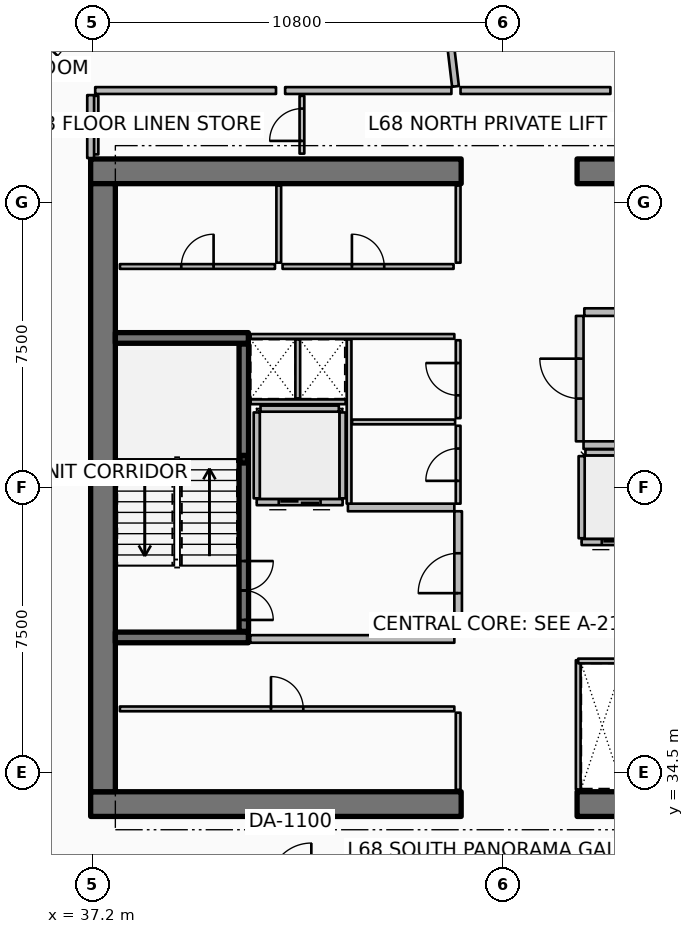
"""IFC4 building model, lengths in metres.
Left out: names, types, materials, properties, quantities, classifications, styles, units other than length and angle.
Written with IfcOpenShell. Run it as: python <this file> out.ifc"""

import sys

from ifc_helpers import new_model, si_unit, direction, frame, frame_2d, origin, origin_2d, place, context, subcontext, project, spatial, rectangle, hollow_rectangle, extrude, element, fill, save


model = new_model("IFC4")
c1 = context("Model", 3, precision=1e-05, world=origin(), true_north=direction((0.0, 1.0)))
c2 = subcontext(c1, "Body", "Model", "MODEL_VIEW")
j1 = project(units=[si_unit("LENGTHUNIT", "METRE"), si_unit("PLANEANGLEUNIT", "RADIAN")], contexts=[c1])
p1 = place(None, origin())
s1 = spatial("IfcSite", under=j1, at=p1, CompositionType="ELEMENT")
p2 = place(p1, origin())
s2 = spatial("IfcBuilding", under=s1, at=p2, CompositionType="ELEMENT")
p3 = place(p2, frame((0.0, 0.0, 271.35)))
s3 = spatial("IfcBuildingStorey", under=s2, at=p3, CompositionType="ELEMENT", Elevation=271.35)
for number, where, z_axis, x_axis in (
    (1, (37.15, 33.675, 0.0), (0.0, 0.0, 1.0), (1.0, 0.0, 0.0)),
    (2, (49.95, 33.675, 0.0), (0.0, 0.0, 1.0), (1.0, 0.0, 0.0)),
    (3, (37.15, 50.325, 0.0), (0.0, 0.0, 1.0), (1.0, 0.0, 0.0)),
    (4, (49.95, 50.325, 0.0), (0.0, 0.0, 1.0), (1.0, 0.0, 0.0)),
):
    element("IfcWall", number, at=place(p3, frame(where, z_axis=z_axis, x_axis=x_axis)), inside=s3, PredefinedType="SHEAR", context=c2, shape_type="SweptSolid", body=[
        extrude(rectangle(XDim=9.75, YDim=0.65, at=frame_2d((4.875, 0.0))), origin(), (0.0, 0.0, 1.0), 3.85),
    ])
p4 = place(p3, frame((37.475, 34.0, 0.0), z_axis=(0.0, 0.0, 1.0), x_axis=(0.0, 1.0, 0.0)))
e5 = element("IfcWall", 5, at=p4, inside=s3, PredefinedType="SHEAR", context=c2, shape_type="SweptSolid", body=[
    extrude(rectangle(XDim=16.0, YDim=0.65, at=frame_2d((8.0, 0.0))), origin(), (0.0, 0.0, 1.0), 3.85),
])
for number, where, z_axis, x_axis in (
    (6, (37.8, 38.06, 0.0), (0.0, 0.0, 1.0), (1.0, 0.0, 0.0)),
    (7, (37.8, 45.94, 0.0), (0.0, 0.0, 1.0), (1.0, 0.0, 0.0)),
):
    element("IfcWall", number, at=place(p3, frame(where, z_axis=z_axis, x_axis=x_axis)), inside=s3, PredefinedType="SHEAR", context=c2, shape_type="SweptSolid", body=[
        extrude(rectangle(XDim=3.5, YDim=0.28, at=frame_2d((1.75, 0.0))), origin(), (0.0, 0.0, 1.0), 3.85),
    ])
p5 = place(p3, frame((41.18, 42.75, 0.0), z_axis=(0.0, 0.0, 1.0), x_axis=(1.0, 0.0, 0.0)))
e8 = element("IfcColumn", 8, at=p5, inside=s3, PredefinedType="COLUMN", context=c2, shape_type="SweptSolid", body=[
    extrude(hollow_rectangle(XDim=0.2, YDim=0.2, WallThickness=0.01, InnerFilletRadius=0.01, OuterFilletRadius=0.02, at=origin_2d()), origin(), (0.0, 0.0, 1.0), 1.72),
])
p6 = place(p3, frame((41.18, 38.22, 0.0), z_axis=(0.0, 0.0, 1.0), x_axis=(0.0, 1.0, 0.0)))
e9 = element("IfcWall", 9, at=p6, inside=s3, PredefinedType="SOLIDWALL", context=c2, shape_type="SweptSolid", body=[
    extrude(rectangle(XDim=7.56, YDim=0.25, at=frame_2d((3.78, 0.0))), origin(), (0.0, 0.0, 1.0), 3.59),
])
p7 = place(p6, frame((0.3, 0.0, 0.0)))
e10 = element("IfcOpeningElement", 10, at=p7, cuts=e9, PredefinedType="OPENING", context=c2, shape_type="SweptSolid", body=[
    extrude(rectangle(XDim=1.55, YDim=2.15, at=frame_2d((0.775, 1.075))), frame((0.0, 0.135, 0.0), z_axis=(0.0, -1.0, 0.0), x_axis=(1.0, 0.0, 0.0)), (0.0, 0.0, 1.0), 0.27),
])
p8 = place(p3, frame((43.78, 41.62, 0.0), z_axis=(0.0, 0.0, 1.0), x_axis=(-1.0, 0.0, 0.0)))
e11 = element("IfcWall", 11, at=p8, inside=s3, PredefinedType="PARTITIONING", context=c2, shape_type="SweptSolid", body=[
    extrude(rectangle(XDim=2.26, YDim=0.16, at=frame_2d((1.13, 0.0))), origin(), (0.0, 0.0, 1.0), 3.59),
])
p9 = place(p8, frame((0.58, 0.0, 0.0)))
e12 = element("IfcOpeningElement", 12, at=p9, cuts=e11, PredefinedType="OPENING", context=c2, shape_type="SweptSolid", body=[
    extrude(rectangle(XDim=1.1, YDim=2.1, at=frame_2d((0.55, 1.05))), frame((0.0, 0.09, 0.0), z_axis=(0.0, -1.0, 0.0), x_axis=(1.0, 0.0, 0.0)), (0.0, 0.0, 1.0), 0.18),
])
for number, where, z_axis, x_axis in (
    (13, (43.78, 41.72, 0.0), (0.0, 0.0, 1.0), (0.0, 1.0, 0.0)),
    (14, (41.52, 41.72, 0.0), (0.0, 0.0, 1.0), (0.0, 1.0, 0.0)),
):
    element("IfcWall", number, at=place(p3, frame(where, z_axis=z_axis, x_axis=x_axis)), inside=s3, PredefinedType="PARTITIONING", context=c2, shape_type="SweptSolid", body=[
        extrude(rectangle(XDim=2.26, YDim=0.16, at=frame_2d((1.13, 0.0))), origin(), (0.0, 0.0, 1.0), 3.59),
    ])
p10 = place(p3, frame((41.62, 44.08, 0.0), z_axis=(0.0, 0.0, 1.0), x_axis=(1.0, 0.0, 0.0)))
e15 = element("IfcWall", 15, at=p10, inside=s3, PredefinedType="PARTITIONING", context=c2, shape_type="SweptSolid", body=[
    extrude(rectangle(XDim=2.06, YDim=0.16, at=frame_2d((1.03, 0.0))), origin(), (0.0, 0.0, 1.0), 3.59),
])
p11 = place(p3, frame((52.23, 40.57, 0.0), z_axis=(0.0, 0.0, 1.0), x_axis=(-1.0, 0.0, 0.0)))
e16 = element("IfcWall", 16, at=p11, inside=s3, PredefinedType="PARTITIONING", context=c2, shape_type="SweptSolid", body=[
    extrude(rectangle(XDim=2.16, YDim=0.16, at=frame_2d((1.08, 0.0))), origin(), (0.0, 0.0, 1.0), 3.59),
])
p12 = place(p11, frame((0.53, 0.0, 0.0)))
e17 = element("IfcOpeningElement", 17, at=p12, cuts=e16, PredefinedType="OPENING", context=c2, shape_type="SweptSolid", body=[
    extrude(rectangle(XDim=1.1, YDim=2.1, at=frame_2d((0.55, 1.05))), frame((0.0, 0.09, 0.0), z_axis=(0.0, -1.0, 0.0), x_axis=(1.0, 0.0, 0.0)), (0.0, 0.0, 1.0), 0.18),
])
p13 = place(p3, frame((50.07, 40.67, 0.0), z_axis=(0.0, 0.0, 1.0), x_axis=(0.0, 1.0, 0.0)))
e18 = element("IfcWall", 18, at=p13, inside=s3, PredefinedType="PARTITIONING", context=c2, shape_type="SweptSolid", body=[
    extrude(rectangle(XDim=2.16, YDim=0.16, at=frame_2d((1.08, 0.0))), origin(), (0.0, 0.0, 1.0), 3.59),
])
p14 = place(p3, frame((50.17, 42.93, 0.0), z_axis=(0.0, 0.0, 1.0), x_axis=(1.0, 0.0, 0.0)))
e19 = element("IfcWall", 19, at=p14, inside=s3, PredefinedType="PARTITIONING", context=c2, shape_type="SweptSolid", body=[
    extrude(rectangle(XDim=1.96, YDim=0.16, at=frame_2d((0.98, 0.0))), origin(), (0.0, 0.0, 1.0), 3.59),
])
p15 = place(p3, frame((46.82, 34.05, 0.0), z_axis=(0.0, 0.0, 1.0), x_axis=(0.0, 1.0, 0.0)))
e20 = element("IfcWall", 20, at=p15, inside=s3, PredefinedType="PARTITIONING", context=c2, shape_type="SweptSolid", body=[
    extrude(rectangle(XDim=2.03, YDim=0.125, at=frame_2d((1.015, 0.0))), origin(), (0.0, 0.0, 1.0), 3.03),
])
p16 = place(p3, frame((37.92, 36.18, 0.0), z_axis=(0.0, 0.0, 1.0), x_axis=(1.0, 0.0, 0.0)))
e21 = element("IfcWall", 21, at=p16, inside=s3, PredefinedType="PARTITIONING", context=c2, shape_type="SweptSolid", body=[
    extrude(rectangle(XDim=8.8, YDim=0.125, at=frame_2d((4.4, 0.0))), origin(), (0.0, 0.0, 1.0), 3.03),
])
p17 = place(p16, frame((3.975, 0.0, 0.0)))
e22 = element("IfcOpeningElement", 22, at=p17, cuts=e21, PredefinedType="OPENING", context=c2, shape_type="SweptSolid", body=[
    extrude(rectangle(XDim=0.85, YDim=2.06, at=frame_2d((0.425, 1.03))), frame((0.0, 0.073, 0.0), z_axis=(0.0, -1.0, 0.0), x_axis=(1.0, 0.0, 0.0)), (0.0, 0.0, 1.0), 0.145),
])
for number, where, z_axis, x_axis in (
    (23, (46.82, 47.92, 0.0), (0.0, 0.0, 1.0), (0.0, 1.0, 0.0)),
    (24, (42.1, 47.92, 0.0), (0.0, 0.0, 1.0), (0.0, 1.0, 0.0)),
):
    element("IfcWall", number, at=place(p3, frame(where, z_axis=z_axis, x_axis=x_axis)), inside=s3, PredefinedType="PARTITIONING", context=c2, shape_type="SweptSolid", body=[
        extrude(rectangle(XDim=2.03, YDim=0.125, at=frame_2d((1.015, 0.0))), origin(), (0.0, 0.0, 1.0), 3.03),
    ])
p18 = place(p3, frame((37.92, 47.82, 0.0), z_axis=(0.0, 0.0, 1.0), x_axis=(1.0, 0.0, 0.0)))
e25 = element("IfcWall", 25, at=p18, inside=s3, PredefinedType="PARTITIONING", context=c2, shape_type="SweptSolid", body=[
    extrude(rectangle(XDim=4.08, YDim=0.125, at=frame_2d((2.04, 0.0))), origin(), (0.0, 0.0, 1.0), 3.03),
])
p19 = place(p18, frame((1.615, 0.0, 0.0)))
e26 = element("IfcOpeningElement", 26, at=p19, cuts=e25, PredefinedType="OPENING", context=c2, shape_type="SweptSolid", body=[
    extrude(rectangle(XDim=0.85, YDim=2.06, at=frame_2d((0.425, 1.03))), frame((0.0, 0.073, 0.0), z_axis=(0.0, -1.0, 0.0), x_axis=(1.0, 0.0, 0.0)), (0.0, 0.0, 1.0), 0.145),
])
p20 = place(p3, frame((42.2, 47.82, 0.0), z_axis=(0.0, 0.0, 1.0), x_axis=(1.0, 0.0, 0.0)))
e27 = element("IfcWall", 27, at=p20, inside=s3, PredefinedType="PARTITIONING", context=c2, shape_type="SweptSolid", body=[
    extrude(rectangle(XDim=4.5, YDim=0.125, at=frame_2d((2.25, 0.0))), origin(), (0.0, 0.0, 1.0), 3.03),
])
p21 = place(p20, frame((1.825, 0.0, 0.0)))
e28 = element("IfcOpeningElement", 28, at=p21, cuts=e27, PredefinedType="OPENING", context=c2, shape_type="SweptSolid", body=[
    extrude(rectangle(XDim=0.85, YDim=2.06, at=frame_2d((0.425, 1.03))), frame((0.0, 0.073, 0.0), z_axis=(0.0, -1.0, 0.0), x_axis=(1.0, 0.0, 0.0)), (0.0, 0.0, 1.0), 0.145),
])
p22 = place(p3, frame((41.35, 38.02, 0.0), z_axis=(0.0, 0.0, 1.0), x_axis=(1.0, 0.0, 0.0)))
e29 = element("IfcWall", 29, at=p22, inside=s3, PredefinedType="PARTITIONING", context=c2, shape_type="SweptSolid", body=[
    extrude(rectangle(XDim=5.37, YDim=0.2, at=frame_2d((2.685, 0.0))), origin(), (0.0, 0.0, 1.0), 3.59),
])
p23 = place(p3, frame((43.92, 41.48, 0.0), z_axis=(0.0, 0.0, 1.0), x_axis=(1.0, 0.0, 0.0)))
e30 = element("IfcWall", 30, at=p23, inside=s3, PredefinedType="PARTITIONING", context=c2, shape_type="SweptSolid", body=[
    extrude(rectangle(XDim=2.8, YDim=0.2, at=frame_2d((1.4, 0.0))), origin(), (0.0, 0.0, 1.0), 3.59),
])
p24 = place(p3, frame((46.82, 38.12, 0.0), z_axis=(0.0, 0.0, 1.0), x_axis=(0.0, 1.0, 0.0)))
e31 = element("IfcWall", 31, at=p24, inside=s3, PredefinedType="PARTITIONING", context=c2, shape_type="SweptSolid", body=[
    extrude(rectangle(XDim=3.26, YDim=0.2, at=frame_2d((1.63, 0.0))), origin(), (0.0, 0.0, 1.0), 3.59),
])
p25 = place(p24, frame((1.105, 0.0, 0.0)))
e32 = element("IfcOpeningElement", 32, at=p25, cuts=e31, PredefinedType="OPENING", context=c2, shape_type="SweptSolid", body=[
    extrude(rectangle(XDim=1.05, YDim=2.1, at=frame_2d((0.525, 1.05))), frame((0.0, 0.11, 0.0), z_axis=(0.0, -1.0, 0.0), x_axis=(1.0, 0.0, 0.0)), (0.0, 0.0, 1.0), 0.22),
])
p26 = place(p3, frame((50.12, 43.12, 0.0), z_axis=(0.0, 0.0, 1.0), x_axis=(1.0, 0.0, 0.0)))
e33 = element("IfcWall", 33, at=p26, inside=s3, PredefinedType="PARTITIONING", context=c2, shape_type="SweptSolid", body=[
    extrude(rectangle(XDim=8.88, YDim=0.2, at=frame_2d((4.44, 0.0))), origin(), (0.0, 0.0, 1.0), 3.59),
])
p27 = place(p3, frame((50.14, 46.62, 0.0), z_axis=(0.0, 0.0, 1.0), x_axis=(1.0, 0.0, 0.0)))
e34 = element("IfcWall", 34, at=p27, inside=s3, PredefinedType="PARTITIONING", context=c2, shape_type="SweptSolid", body=[
    extrude(rectangle(XDim=1.02, YDim=0.2, at=frame_2d((0.51, 0.0))), origin(), (0.0, 0.0, 1.0), 3.59),
])
p28 = place(p3, frame((50.02, 43.22, 0.0), z_axis=(0.0, 0.0, 1.0), x_axis=(0.0, 1.0, 0.0)))
e35 = element("IfcWall", 35, at=p28, inside=s3, PredefinedType="PARTITIONING", context=c2, shape_type="SweptSolid", body=[
    extrude(rectangle(XDim=3.3, YDim=0.2, at=frame_2d((1.65, 0.0))), origin(), (0.0, 0.0, 1.0), 3.59),
])
p29 = place(p28, frame((1.125, 0.0, 0.0)))
e36 = element("IfcOpeningElement", 36, at=p29, cuts=e35, PredefinedType="OPENING", context=c2, shape_type="SweptSolid", body=[
    extrude(rectangle(XDim=1.05, YDim=2.1, at=frame_2d((0.525, 1.05))), frame((0.0, 0.11, 0.0), z_axis=(0.0, -1.0, 0.0), x_axis=(1.0, 0.0, 0.0)), (0.0, 0.0, 1.0), 0.22),
])
p30 = place(p3, frame((41.36, 45.98, 0.0), z_axis=(0.0, 0.0, 1.0), x_axis=(1.0, 0.0, 0.0)))
e37 = element("IfcWall", 37, at=p30, inside=s3, PredefinedType="PARTITIONING", context=c2, shape_type="SweptSolid", body=[
    extrude(rectangle(XDim=5.36, YDim=0.125, at=frame_2d((2.68, 0.0))), origin(), (0.0, 0.0, 1.0), 3.03),
])
p31 = place(p3, frame((41.36, 44.26, 0.0), z_axis=(0.0, 0.0, 1.0), x_axis=(1.0, 0.0, 0.0)))
e38 = element("IfcWall", 38, at=p31, inside=s3, PredefinedType="PARTITIONING", context=c2, shape_type="SweptSolid", body=[
    extrude(rectangle(XDim=2.5, YDim=0.125, at=frame_2d((1.25, 0.0))), origin(), (0.0, 0.0, 1.0), 3.03),
])
p32 = place(p3, frame((42.6, 44.35, 0.0), z_axis=(0.0, 0.0, 1.0), x_axis=(0.0, 1.0, 0.0)))
e39 = element("IfcWall", 39, at=p32, inside=s3, PredefinedType="PARTITIONING", context=c2, shape_type="SweptSolid", body=[
    extrude(rectangle(XDim=1.55, YDim=0.125, at=frame_2d((0.775, 0.0))), origin(), (0.0, 0.0, 1.0), 3.03),
])
p33 = place(p3, frame((49.98, 34.06, 0.0), z_axis=(0.0, 0.0, 1.0), x_axis=(0.0, 1.0, 0.0)))
e40 = element("IfcWall", 40, at=p33, inside=s3, PredefinedType="PARTITIONING", context=c2, shape_type="SweptSolid", body=[
    extrude(rectangle(XDim=3.4, YDim=0.125, at=frame_2d((1.7, 0.0))), origin(), (0.0, 0.0, 1.0), 3.03),
])
p34 = place(p3, frame((49.98, 37.44, 0.0), z_axis=(0.0, 0.0, 1.0), x_axis=(1.0, 0.0, 0.0)))
e41 = element("IfcWall", 41, at=p34, inside=s3, PredefinedType="PARTITIONING", context=c2, shape_type="SweptSolid", body=[
    extrude(rectangle(XDim=1.26, YDim=0.125, at=frame_2d((0.63, 0.0))), origin(), (0.0, 0.0, 1.0), 3.03),
])
p35 = place(p3, frame((43.95, 41.58, 0.0), z_axis=(0.0, 0.0, 1.0), x_axis=(0.0, 1.0, 0.0)))
e42 = element("IfcWall", 42, at=p35, inside=s3, PredefinedType="PARTITIONING", context=c2, shape_type="SweptSolid", body=[
    extrude(rectangle(XDim=4.32, YDim=0.125, at=frame_2d((2.16, 0.0))), origin(), (0.0, 0.0, 1.0), 3.03),
])
p36 = place(p3, frame((44.03, 43.73, 0.0), z_axis=(0.0, 0.0, 1.0), x_axis=(1.0, 0.0, 0.0)))
e43 = element("IfcWall", 43, at=p36, inside=s3, PredefinedType="PARTITIONING", context=c2, shape_type="SweptSolid", body=[
    extrude(rectangle(XDim=2.71, YDim=0.125, at=frame_2d((1.355, 0.0))), origin(), (0.0, 0.0, 1.0), 3.03),
])
p37 = place(p3, frame((46.82, 41.58, 0.0), z_axis=(0.0, 0.0, 1.0), x_axis=(0.0, 1.0, 0.0)))
e44 = element("IfcWall", 44, at=p37, inside=s3, PredefinedType="PARTITIONING", context=c2, shape_type="SweptSolid", body=[
    extrude(rectangle(XDim=2.05, YDim=0.125, at=frame_2d((1.025, 0.0))), origin(), (0.0, 0.0, 1.0), 3.03),
])
p38 = place(p37, frame((0.6, 0.0, 0.0)))
e45 = element("IfcOpeningElement", 45, at=p38, cuts=e44, PredefinedType="OPENING", context=c2, shape_type="SweptSolid", body=[
    extrude(rectangle(XDim=0.85, YDim=2.06, at=frame_2d((0.425, 1.03))), frame((0.0, 0.073, 0.0), z_axis=(0.0, -1.0, 0.0), x_axis=(1.0, 0.0, 0.0)), (0.0, 0.0, 1.0), 0.145),
])
p39 = place(p3, frame((46.82, 43.83, 0.0), z_axis=(0.0, 0.0, 1.0), x_axis=(0.0, 1.0, 0.0)))
e46 = element("IfcWall", 46, at=p39, inside=s3, PredefinedType="PARTITIONING", context=c2, shape_type="SweptSolid", body=[
    extrude(rectangle(XDim=2.05, YDim=0.125, at=frame_2d((1.025, 0.0))), origin(), (0.0, 0.0, 1.0), 3.03),
])
p40 = place(p39, frame((0.6, 0.0, 0.0)))
e47 = element("IfcOpeningElement", 47, at=p40, cuts=e46, PredefinedType="OPENING", context=c2, shape_type="SweptSolid", body=[
    extrude(rectangle(XDim=0.85, YDim=2.06, at=frame_2d((0.425, 1.03))), frame((0.0, 0.073, 0.0), z_axis=(0.0, -1.0, 0.0), x_axis=(1.0, 0.0, 0.0)), (0.0, 0.0, 1.0), 0.145),
])
p41 = place(p3, frame((37.29, 50.77, 0.0), z_axis=(0.0, 0.0, 1.0), x_axis=(0.0, 1.0, 0.0)))
e48 = element("IfcWall", 48, at=p41, inside=s3, PredefinedType="PARTITIONING", context=c2, shape_type="SweptSolid", body=[
    extrude(rectangle(XDim=1.54, YDim=0.125, at=frame_2d((0.77, 0.0))), origin(), (0.0, 0.0, 1.0), 3.03),
])
p42 = place(p3, frame((42.71, 50.79, 0.0), z_axis=(0.0, 0.0, 1.0), x_axis=(0.0, 1.0, 0.0)))
e49 = element("IfcWall", 49, at=p42, inside=s3, PredefinedType="PARTITIONING", context=c2, shape_type="SweptSolid", body=[
    extrude(rectangle(XDim=1.52, YDim=0.125, at=frame_2d((0.76, 0.0))), origin(), (0.0, 0.0, 1.0), 2.957),
])
p43 = place(p42, frame((0.335, 0.0, 0.0)))
e50 = element("IfcOpeningElement", 50, at=p43, cuts=e49, PredefinedType="OPENING", context=c2, shape_type="SweptSolid", body=[
    extrude(rectangle(XDim=0.85, YDim=2.06, at=frame_2d((0.425, 1.03))), frame((0.0, 0.073, 0.0), z_axis=(0.0, -1.0, 0.0), x_axis=(1.0, 0.0, 0.0)), (0.0, 0.0, 1.0), 0.145),
])
p44 = place(p3, frame((46.75, 52.559, 0.0), z_axis=(0.0, 0.0, 1.0), x_axis=(-0.117540318076, 0.993068111273, 0.0)))
e51 = element("IfcWall", 51, at=p44, inside=s3, PredefinedType="PARTITIONING", context=c2, shape_type="SweptSolid", body=[
    extrude(rectangle(XDim=14.062, YDim=0.18, at=frame_2d((7.031, 0.0))), origin(), (0.0, 0.0, 1.0), 2.957),
])
p45 = place(p3, frame((46.643, 52.45, 0.0), z_axis=(0.0, 0.0, 1.0), x_axis=(-1.0, 0.0, 0.0)))
e52 = element("IfcWall", 52, at=p45, inside=s3, PredefinedType="PARTITIONING", context=c2, shape_type="SweptSolid", body=[
    extrude(rectangle(XDim=4.376, YDim=0.18, at=frame_2d((2.188, 0.0))), origin(), (0.0, 0.0, 1.0), 2.957),
])
p46 = place(p3, frame((42.028, 52.45, 0.0), z_axis=(0.0, 0.0, 1.0), x_axis=(-1.0, 0.0, 0.0)))
e53 = element("IfcWall", 53, at=p46, inside=s3, PredefinedType="PARTITIONING", context=c2, shape_type="SweptSolid", body=[
    extrude(rectangle(XDim=4.758, YDim=0.18, at=frame_2d((2.379, 0.0))), origin(), (0.0, 0.0, 1.0), 2.957),
])
p47 = place(p3, frame((37.15, 52.33, 0.0), z_axis=(0.0, 0.0, 1.0), x_axis=(0.0, -1.0, 0.0)))
e54 = element("IfcWall", 54, at=p47, inside=s3, PredefinedType="PARTITIONING", context=c2, shape_type="SweptSolid", body=[
    extrude(rectangle(XDim=1.656, YDim=0.18, at=frame_2d((0.828, 0.0))), origin(), (0.0, 0.0, 1.0), 2.957),
])
p48 = place(p3, frame((37.506, 55.822, 0.0), z_axis=(0.0, 0.0, 1.0), x_axis=(-0.715105814901, -0.699016218334, 0.0)))
e55 = element("IfcWall", 55, at=p48, inside=s3, PredefinedType="PARTITIONING", context=c2, shape_type="SweptSolid", body=[
    extrude(rectangle(XDim=4.294, YDim=0.125, at=frame_2d((2.147, 0.0))), origin(), (0.0, 0.0, 1.0), 2.957),
])
p49 = place(p48, frame((1.697, 0.0, 0.0)))
e56 = element("IfcOpeningElement", 56, at=p49, cuts=e55, PredefinedType="OPENING", context=c2, shape_type="SweptSolid", body=[
    extrude(rectangle(XDim=0.9, YDim=2.08, at=frame_2d((0.45, 1.04))), frame((0.0, 0.073, 0.0), z_axis=(0.0, -1.0, 0.0), x_axis=(1.0, 0.0, 0.0)), (0.0, 0.0, 1.0), 0.145),
])
p50 = place(p3, frame((50.827, 52.45, 0.0), z_axis=(0.0, 0.0, 1.0), x_axis=(-1.0, 0.0, 0.0)))
e57 = element("IfcWall", 57, at=p50, inside=s3, PredefinedType="PARTITIONING", context=c2, shape_type="SweptSolid", body=[
    extrude(rectangle(XDim=3.944, YDim=0.18, at=frame_2d((1.972, 0.0))), origin(), (0.0, 0.0, 1.0), 2.957),
])
p51 = place(p7, origin())
e58 = element("IfcDoor", 58, at=p51, inside=s3, OperationType="DOUBLE_DOOR_SINGLE_SWING", PredefinedType="DOOR", context=c2, shape_type="SweptSolid", body=[
    extrude(rectangle(XDim=1.55, YDim=2.15, at=frame_2d((0.775, 1.075))), frame((0.0, 0.025, 0.0), z_axis=(0.0, -1.0, 0.0), x_axis=(1.0, 0.0, 0.0)), (0.0, 0.0, 1.0), 0.05),
])
fill(e10, e58)
p52 = place(p9, origin())
e59 = element("IfcDoor", 59, at=p52, inside=s3, OperationType="DOUBLE_DOOR_SLIDING", PredefinedType="DOOR", context=c2, shape_type="SweptSolid", body=[
    extrude(rectangle(XDim=1.1, YDim=2.1, at=frame_2d((0.55, 1.05))), frame((0.0, 0.025, 0.0), z_axis=(0.0, -1.0, 0.0), x_axis=(1.0, 0.0, 0.0)), (0.0, 0.0, 1.0), 0.05),
])
fill(e12, e59)
p53 = place(p12, origin())
e60 = element("IfcDoor", 60, at=p53, inside=s3, OperationType="DOUBLE_DOOR_SLIDING", PredefinedType="DOOR", context=c2, shape_type="SweptSolid", body=[
    extrude(rectangle(XDim=1.1, YDim=2.1, at=frame_2d((0.55, 1.05))), frame((0.0, 0.025, 0.0), z_axis=(0.0, -1.0, 0.0), x_axis=(1.0, 0.0, 0.0)), (0.0, 0.0, 1.0), 0.05),
])
fill(e17, e60)
p54 = place(p17, origin())
e61 = element("IfcDoor", 61, at=p54, inside=s3, OperationType="SINGLE_SWING_LEFT", PredefinedType="DOOR", context=c2, shape_type="SweptSolid", body=[
    extrude(rectangle(XDim=0.85, YDim=2.06, at=frame_2d((0.425, 1.03))), frame((0.0, 0.025, 0.0), z_axis=(0.0, -1.0, 0.0), x_axis=(1.0, 0.0, 0.0)), (0.0, 0.0, 1.0), 0.05),
])
fill(e22, e61)
p55 = place(p19, origin())
e62 = element("IfcDoor", 62, at=p55, inside=s3, OperationType="SINGLE_SWING_RIGHT", PredefinedType="DOOR", context=c2, shape_type="SweptSolid", body=[
    extrude(rectangle(XDim=0.85, YDim=2.06, at=frame_2d((0.425, 1.03))), frame((0.0, 0.025, 0.0), z_axis=(0.0, -1.0, 0.0), x_axis=(1.0, 0.0, 0.0)), (0.0, 0.0, 1.0), 0.05),
])
fill(e26, e62)
p56 = place(p21, origin())
e63 = element("IfcDoor", 63, at=p56, inside=s3, OperationType="SINGLE_SWING_LEFT", PredefinedType="DOOR", context=c2, shape_type="SweptSolid", body=[
    extrude(rectangle(XDim=0.85, YDim=2.06, at=frame_2d((0.425, 1.03))), frame((0.0, 0.025, 0.0), z_axis=(0.0, -1.0, 0.0), x_axis=(1.0, 0.0, 0.0)), (0.0, 0.0, 1.0), 0.05),
])
fill(e28, e63)
p57 = place(p25, origin())
e64 = element("IfcDoor", 64, at=p57, inside=s3, OperationType="SINGLE_SWING_LEFT", PredefinedType="DOOR", context=c2, shape_type="SweptSolid", body=[
    extrude(rectangle(XDim=1.05, YDim=2.1, at=frame_2d((0.525, 1.05))), frame((0.0, 0.025, 0.0), z_axis=(0.0, -1.0, 0.0), x_axis=(1.0, 0.0, 0.0)), (0.0, 0.0, 1.0), 0.05),
])
fill(e32, e64)
p58 = place(p29, origin())
e65 = element("IfcDoor", 65, at=p58, inside=s3, OperationType="SINGLE_SWING_RIGHT", PredefinedType="DOOR", context=c2, shape_type="SweptSolid", body=[
    extrude(rectangle(XDim=1.05, YDim=2.1, at=frame_2d((0.525, 1.05))), frame((0.0, 0.025, 0.0), z_axis=(0.0, -1.0, 0.0), x_axis=(1.0, 0.0, 0.0)), (0.0, 0.0, 1.0), 0.05),
])
fill(e36, e65)
p59 = place(p38, origin())
e66 = element("IfcDoor", 66, at=p59, inside=s3, OperationType="SINGLE_SWING_LEFT", PredefinedType="DOOR", context=c2, shape_type="SweptSolid", body=[
    extrude(rectangle(XDim=0.85, YDim=2.06, at=frame_2d((0.425, 1.03))), frame((0.0, 0.025, 0.0), z_axis=(0.0, -1.0, 0.0), x_axis=(1.0, 0.0, 0.0)), (0.0, 0.0, 1.0), 0.05),
])
fill(e45, e66)
p60 = place(p40, origin())
e67 = element("IfcDoor", 67, at=p60, inside=s3, OperationType="SINGLE_SWING_RIGHT", PredefinedType="DOOR", context=c2, shape_type="SweptSolid", body=[
    extrude(rectangle(XDim=0.85, YDim=2.06, at=frame_2d((0.425, 1.03))), frame((0.0, 0.025, 0.0), z_axis=(0.0, -1.0, 0.0), x_axis=(1.0, 0.0, 0.0)), (0.0, 0.0, 1.0), 0.05),
])
fill(e47, e67)
p61 = place(p43, origin())
e68 = element("IfcDoor", 68, at=p61, inside=s3, OperationType="SINGLE_SWING_LEFT", PredefinedType="DOOR", context=c2, shape_type="SweptSolid", body=[
    extrude(rectangle(XDim=0.85, YDim=2.06, at=frame_2d((0.425, 1.03))), frame((0.0, 0.025, 0.0), z_axis=(0.0, -1.0, 0.0), x_axis=(1.0, 0.0, 0.0)), (0.0, 0.0, 1.0), 0.05),
])
fill(e50, e68)
save(model, sys.argv[1])
